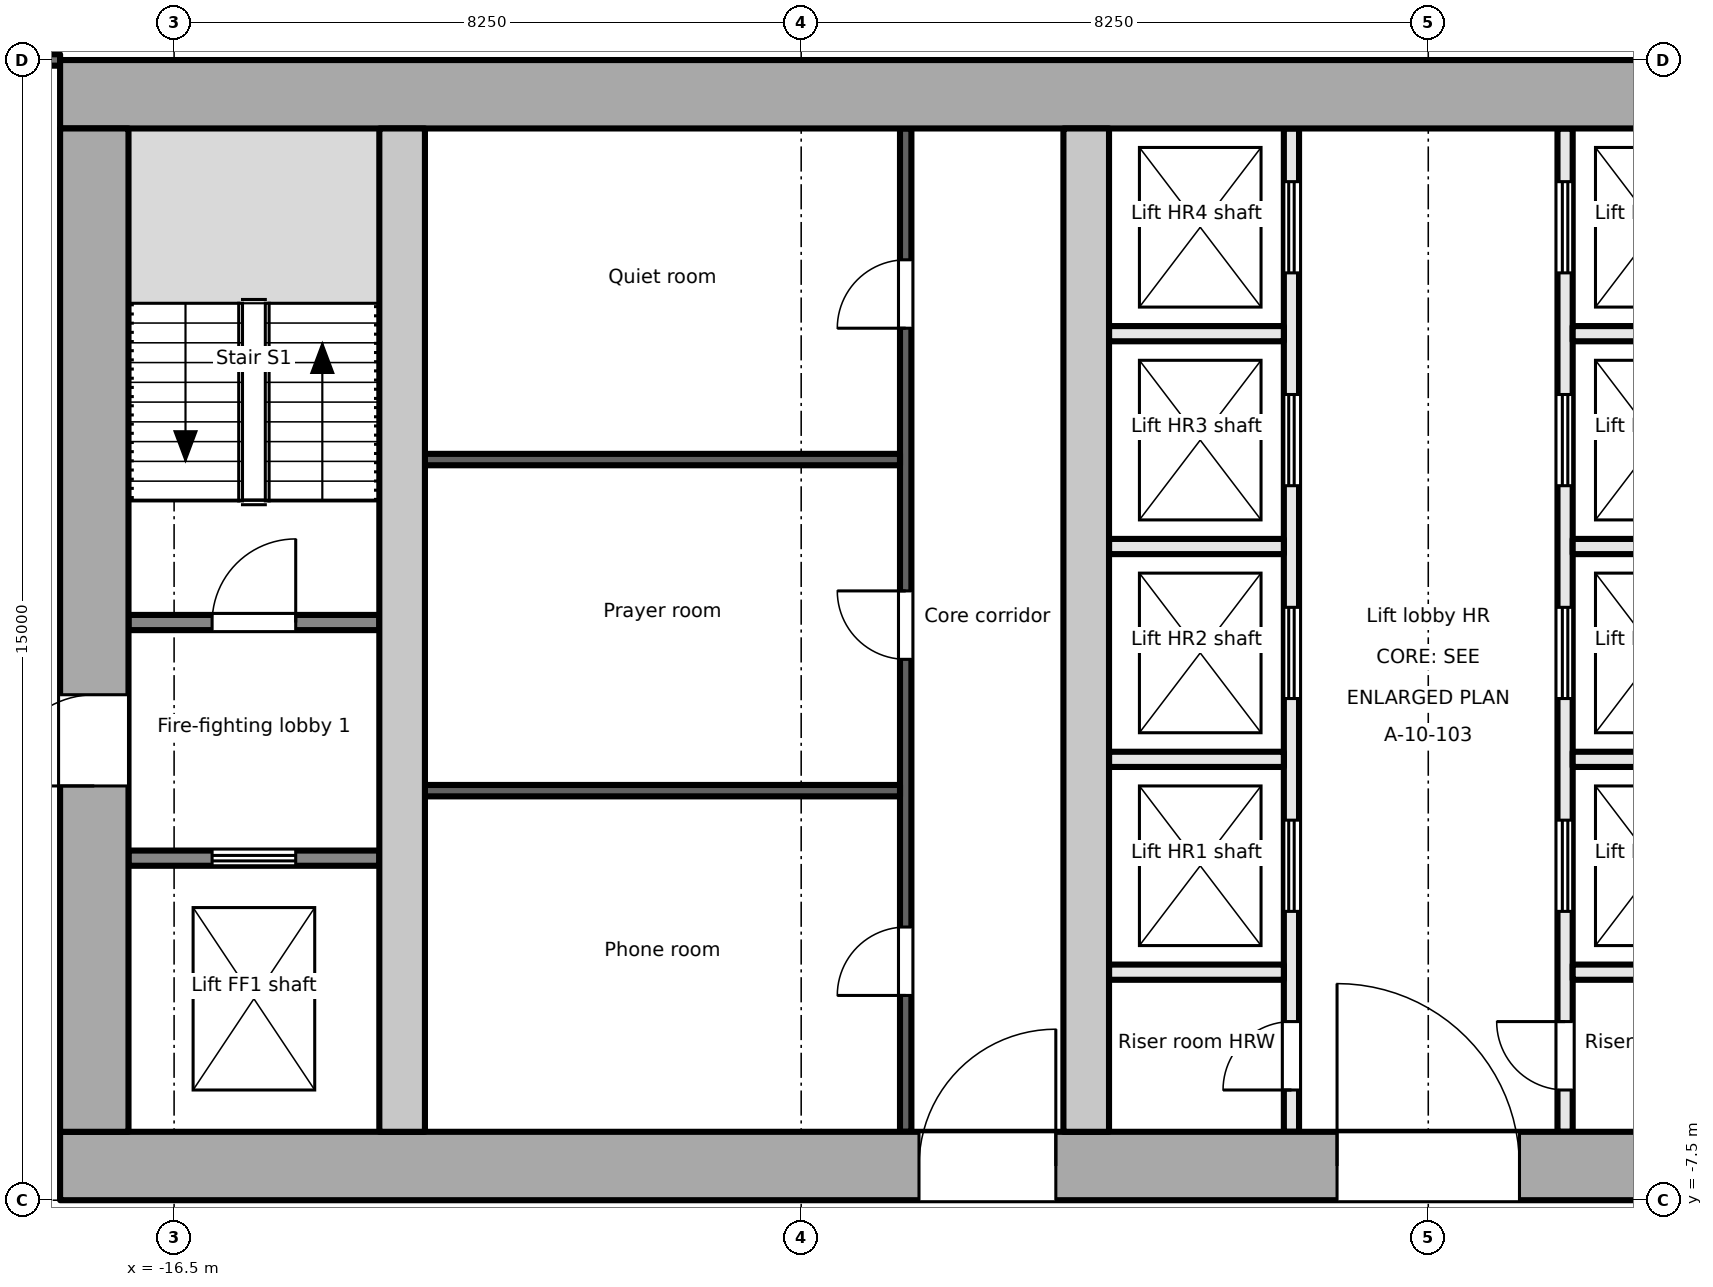
"""IFC4 building model, lengths in metres.
Left out: names, types, materials, properties, quantities, classifications, styles, units other than length and angle.
Written with IfcOpenShell. Run it as: python <this file> out.ifc"""

import sys

from ifc_helpers import new_model, si_unit, direction, frame, frame_2d, origin, place, context, subcontext, project, spatial, rectangle, extrude, element, fill, save


model = new_model("IFC4")
c1 = context("Model", 3, precision=1e-05, world=origin(), true_north=direction((0.0, 1.0)))
c2 = subcontext(c1, "Body", "Model", "MODEL_VIEW")
j1 = project(units=[si_unit("LENGTHUNIT", "METRE"), si_unit("PLANEANGLEUNIT", "RADIAN")], contexts=[c1])
p1 = place(None, origin())
s1 = spatial("IfcSite", under=j1, at=p1, CompositionType="ELEMENT")
p2 = place(p1, origin())
s2 = spatial("IfcBuilding", under=s1, at=p2, CompositionType="ELEMENT")
p3 = place(p2, frame((0.0, 0.0, 188.0)))
s3 = spatial("IfcBuildingStorey", under=s2, at=p3, CompositionType="ELEMENT", Elevation=188.0)
p4 = place(p3, frame((-18.0, -7.05, -0.2), z_axis=(0.0, 0.0, 1.0), x_axis=(1.0, 0.0, 0.0)))
e1 = element("IfcWall", 1, at=p4, inside=s3, PredefinedType="SHEAR", context=c2, shape_type="SweptSolid", body=[
    extrude(rectangle(XDim=36.0, YDim=0.9, at=frame_2d((18.0, 0.0))), origin(), (0.0, 0.0, 1.0), 3.9),
])
p5 = place(p4, frame((11.3, 0.0, 0.2)))
e2 = element("IfcOpeningElement", 2, at=p5, cuts=e1, PredefinedType="OPENING", context=c2, shape_type="SweptSolid", body=[
    extrude(rectangle(XDim=1.8, YDim=2.1, at=frame_2d((0.9, 1.05))), frame((0.0, 0.46, 0.0), z_axis=(0.0, -1.0, 0.0), x_axis=(1.0, 0.0, 0.0)), (0.0, 0.0, 1.0), 0.921),
])
p6 = place(p4, frame((16.8, 0.0, 0.2)))
e3 = element("IfcOpeningElement", 3, at=p6, cuts=e1, PredefinedType="OPENING", context=c2, shape_type="SweptSolid", body=[
    extrude(rectangle(XDim=2.4, YDim=2.1, at=frame_2d((1.2, 1.05))), frame((0.0, 0.46, 0.0), z_axis=(0.0, -1.0, 0.0), x_axis=(1.0, 0.0, 0.0)), (0.0, 0.0, 1.0), 0.921),
])
p7 = place(p4, frame((26.1, 0.0, 0.2)))
e4 = element("IfcOpeningElement", 4, at=p7, cuts=e1, PredefinedType="OPENING", context=c2, shape_type="SweptSolid", body=[
    extrude(rectangle(XDim=2.4, YDim=2.1, at=frame_2d((1.2, 1.05))), frame((0.0, 0.46, 0.0), z_axis=(0.0, -1.0, 0.0), x_axis=(1.0, 0.0, 0.0)), (0.0, 0.0, 1.0), 0.921),
])
p8 = place(p3, frame((-18.0, 7.05, -0.2), z_axis=(0.0, 0.0, 1.0), x_axis=(1.0, 0.0, 0.0)))
e5 = element("IfcWall", 5, at=p8, inside=s3, PredefinedType="SHEAR", context=c2, shape_type="SweptSolid", body=[
    extrude(rectangle(XDim=36.0, YDim=0.9, at=frame_2d((18.0, 0.0))), origin(), (0.0, 0.0, 1.0), 3.9),
])
p9 = place(p3, frame((-17.55, -6.6, -0.2), z_axis=(0.0, 0.0, 1.0), x_axis=(0.0, 1.0, 0.0)))
e6 = element("IfcWall", 6, at=p9, inside=s3, PredefinedType="SHEAR", context=c2, shape_type="SweptSolid", body=[
    extrude(rectangle(XDim=13.2, YDim=0.9, at=frame_2d((6.6, 0.0))), origin(), (0.0, 0.0, 1.0), 3.9),
])
p10 = place(p9, frame((4.55, 0.0, 0.2)))
e7 = element("IfcOpeningElement", 7, at=p10, cuts=e6, PredefinedType="OPENING", context=c2, shape_type="SweptSolid", body=[
    extrude(rectangle(XDim=1.2, YDim=2.1, at=frame_2d((0.6, 1.05))), frame((0.0, 0.46, 0.0), z_axis=(0.0, -1.0, 0.0), x_axis=(1.0, 0.0, 0.0)), (0.0, 0.0, 1.0), 0.921),
])
for number, where, z_axis, x_axis in (
    (8, (-13.5, -6.6, -0.2), (0.0, 0.0, 1.0), (0.0, 1.0, 0.0)),
    (9, (-4.5, -6.6, -0.2), (0.0, 0.0, 1.0), (0.0, 1.0, 0.0)),
):
    element("IfcWall", number, at=place(p3, frame(where, z_axis=z_axis, x_axis=x_axis)), inside=s3, PredefinedType="SHEAR", context=c2, shape_type="SweptSolid", body=[
        extrude(rectangle(XDim=13.2, YDim=0.6, at=frame_2d((6.6, 0.0))), origin(), (0.0, 0.0, 1.0), 3.9),
    ])
p11 = place(p3, frame((-17.1, -3.0, 0.0), z_axis=(0.0, 0.0, 1.0), x_axis=(1.0, 0.0, 0.0)))
e10 = element("IfcWall", 10, at=p11, inside=s3, PredefinedType="PARTITIONING", context=c2, shape_type="SweptSolid", body=[
    extrude(rectangle(XDim=3.3, YDim=0.2, at=frame_2d((1.65, 0.0))), origin(), (0.0, 0.0, 1.0), 3.7),
])
p12 = place(p11, frame((1.1, 0.0, 0.0)))
e11 = element("IfcOpeningElement", 11, at=p12, cuts=e10, PredefinedType="OPENING", context=c2, shape_type="SweptSolid", body=[
    extrude(rectangle(XDim=1.1, YDim=2.1, at=frame_2d((0.55, 1.05))), frame((0.0, 0.111, 0.0), z_axis=(0.0, -1.0, 0.0), x_axis=(1.0, 0.0, 0.0)), (0.0, 0.0, 1.0), 0.221),
])
p13 = place(p3, frame((-17.1, 0.1, 0.0), z_axis=(0.0, 0.0, 1.0), x_axis=(1.0, 0.0, 0.0)))
e12 = element("IfcWall", 12, at=p13, inside=s3, PredefinedType="PARTITIONING", context=c2, shape_type="SweptSolid", body=[
    extrude(rectangle(XDim=3.3, YDim=0.2, at=frame_2d((1.65, 0.0))), origin(), (0.0, 0.0, 1.0), 3.7),
])
p14 = place(p13, frame((1.1, 0.0, 0.0)))
e13 = element("IfcOpeningElement", 13, at=p14, cuts=e12, PredefinedType="OPENING", context=c2, shape_type="SweptSolid", body=[
    extrude(rectangle(XDim=1.1, YDim=2.1, at=frame_2d((0.55, 1.05))), frame((0.0, 0.111, 0.0), z_axis=(0.0, -1.0, 0.0), x_axis=(1.0, 0.0, 0.0)), (0.0, 0.0, 1.0), 0.221),
])
p15 = place(p3, frame((-6.875, -6.6, 0.0), z_axis=(0.0, 0.0, 1.0), x_axis=(0.0, 1.0, 0.0)))
e14 = element("IfcWall", 14, at=p15, inside=s3, PredefinedType="PARTITIONING", context=c2, shape_type="SweptSolid", body=[
    extrude(rectangle(XDim=13.2, YDim=0.15, at=frame_2d((6.6, 0.0))), origin(), (0.0, 0.0, 1.0), 3.7),
])
p16 = place(p15, frame((1.794, 0.0, 0.0)))
e15 = element("IfcOpeningElement", 15, at=p16, cuts=e14, PredefinedType="OPENING", context=c2, shape_type="SweptSolid", body=[
    extrude(rectangle(XDim=0.9, YDim=2.1, at=frame_2d((0.45, 1.05))), frame((0.0, 0.085, 0.0), z_axis=(0.0, -1.0, 0.0), x_axis=(1.0, 0.0, 0.0)), (0.0, 0.0, 1.0), 0.171),
])
p17 = place(p15, frame((6.216, 0.0, 0.0)))
e16 = element("IfcOpeningElement", 16, at=p17, cuts=e14, PredefinedType="OPENING", context=c2, shape_type="SweptSolid", body=[
    extrude(rectangle(XDim=0.9, YDim=2.1, at=frame_2d((0.45, 1.05))), frame((0.0, 0.085, 0.0), z_axis=(0.0, -1.0, 0.0), x_axis=(1.0, 0.0, 0.0)), (0.0, 0.0, 1.0), 0.171),
])
p18 = place(p15, frame((10.572, 0.0, 0.0)))
e17 = element("IfcOpeningElement", 17, at=p18, cuts=e14, PredefinedType="OPENING", context=c2, shape_type="SweptSolid", body=[
    extrude(rectangle(XDim=0.9, YDim=2.1, at=frame_2d((0.45, 1.05))), frame((0.0, 0.085, 0.0), z_axis=(0.0, -1.0, 0.0), x_axis=(1.0, 0.0, 0.0)), (0.0, 0.0, 1.0), 0.171),
])
for number, where, z_axis, x_axis in (
    (18, (-13.2, -2.112, 0.0), (0.0, 0.0, 1.0), (1.0, 0.0, 0.0)),
    (19, (-13.2, 2.244, 0.0), (0.0, 0.0, 1.0), (1.0, 0.0, 0.0)),
):
    element("IfcWall", number, at=place(p3, frame(where, z_axis=z_axis, x_axis=x_axis)), inside=s3, PredefinedType="PARTITIONING", context=c2, shape_type="SweptSolid", body=[
        extrude(rectangle(XDim=6.25, YDim=0.15, at=frame_2d((3.125, 0.0))), origin(), (0.0, 0.0, 1.0), 3.7),
    ])
p19 = place(p3, frame((-1.8, -6.6, 0.0), z_axis=(0.0, 0.0, 1.0), x_axis=(0.0, 1.0, 0.0)))
e20 = element("IfcWall", 20, at=p19, inside=s3, PredefinedType="PARTITIONING", context=c2, shape_type="SweptSolid", body=[
    extrude(rectangle(XDim=13.2, YDim=0.2, at=frame_2d((6.6, 0.0))), origin(), (0.0, 0.0, 1.0), 3.7),
])
p20 = place(p19, frame((0.55, 0.0, 0.0)))
e21 = element("IfcOpeningElement", 21, at=p20, cuts=e20, PredefinedType="OPENING", context=c2, shape_type="SweptSolid", body=[
    extrude(rectangle(XDim=0.9, YDim=2.1, at=frame_2d((0.45, 1.05))), frame((0.0, 0.111, 0.0), z_axis=(0.0, -1.0, 0.0), x_axis=(1.0, 0.0, 0.0)), (0.0, 0.0, 1.0), 0.221),
])
p21 = place(p19, frame((2.9, 0.0, 0.0)))
e22 = element("IfcOpeningElement", 22, at=p21, cuts=e20, PredefinedType="OPENING", context=c2, shape_type="SweptSolid", body=[
    extrude(rectangle(XDim=1.2, YDim=2.1, at=frame_2d((0.6, 1.05))), frame((0.0, 0.111, 0.0), z_axis=(0.0, -1.0, 0.0), x_axis=(1.0, 0.0, 0.0)), (0.0, 0.0, 1.0), 0.221),
])
p22 = place(p19, frame((5.7, 0.0, 0.0)))
e23 = element("IfcOpeningElement", 23, at=p22, cuts=e20, PredefinedType="OPENING", context=c2, shape_type="SweptSolid", body=[
    extrude(rectangle(XDim=1.2, YDim=2.1, at=frame_2d((0.6, 1.05))), frame((0.0, 0.111, 0.0), z_axis=(0.0, -1.0, 0.0), x_axis=(1.0, 0.0, 0.0)), (0.0, 0.0, 1.0), 0.221),
])
p23 = place(p19, frame((8.5, 0.0, 0.0)))
e24 = element("IfcOpeningElement", 24, at=p23, cuts=e20, PredefinedType="OPENING", context=c2, shape_type="SweptSolid", body=[
    extrude(rectangle(XDim=1.2, YDim=2.1, at=frame_2d((0.6, 1.05))), frame((0.0, 0.111, 0.0), z_axis=(0.0, -1.0, 0.0), x_axis=(1.0, 0.0, 0.0)), (0.0, 0.0, 1.0), 0.221),
])
p24 = place(p19, frame((11.3, 0.0, 0.0)))
e25 = element("IfcOpeningElement", 25, at=p24, cuts=e20, PredefinedType="OPENING", context=c2, shape_type="SweptSolid", body=[
    extrude(rectangle(XDim=1.2, YDim=2.1, at=frame_2d((0.6, 1.05))), frame((0.0, 0.111, 0.0), z_axis=(0.0, -1.0, 0.0), x_axis=(1.0, 0.0, 0.0)), (0.0, 0.0, 1.0), 0.221),
])
p25 = place(p3, frame((1.8, -6.6, 0.0), z_axis=(0.0, 0.0, 1.0), x_axis=(0.0, 1.0, 0.0)))
e26 = element("IfcWall", 26, at=p25, inside=s3, PredefinedType="PARTITIONING", context=c2, shape_type="SweptSolid", body=[
    extrude(rectangle(XDim=13.2, YDim=0.2, at=frame_2d((6.6, 0.0))), origin(), (0.0, 0.0, 1.0), 3.7),
])
p26 = place(p25, frame((0.55, 0.0, 0.0)))
e27 = element("IfcOpeningElement", 27, at=p26, cuts=e26, PredefinedType="OPENING", context=c2, shape_type="SweptSolid", body=[
    extrude(rectangle(XDim=0.9, YDim=2.1, at=frame_2d((0.45, 1.05))), frame((0.0, 0.111, 0.0), z_axis=(0.0, -1.0, 0.0), x_axis=(1.0, 0.0, 0.0)), (0.0, 0.0, 1.0), 0.221),
])
p27 = place(p25, frame((2.9, 0.0, 0.0)))
e28 = element("IfcOpeningElement", 28, at=p27, cuts=e26, PredefinedType="OPENING", context=c2, shape_type="SweptSolid", body=[
    extrude(rectangle(XDim=1.2, YDim=2.1, at=frame_2d((0.6, 1.05))), frame((0.0, 0.111, 0.0), z_axis=(0.0, -1.0, 0.0), x_axis=(1.0, 0.0, 0.0)), (0.0, 0.0, 1.0), 0.221),
])
p28 = place(p25, frame((5.7, 0.0, 0.0)))
e29 = element("IfcOpeningElement", 29, at=p28, cuts=e26, PredefinedType="OPENING", context=c2, shape_type="SweptSolid", body=[
    extrude(rectangle(XDim=1.2, YDim=2.1, at=frame_2d((0.6, 1.05))), frame((0.0, 0.111, 0.0), z_axis=(0.0, -1.0, 0.0), x_axis=(1.0, 0.0, 0.0)), (0.0, 0.0, 1.0), 0.221),
])
p29 = place(p25, frame((8.5, 0.0, 0.0)))
e30 = element("IfcOpeningElement", 30, at=p29, cuts=e26, PredefinedType="OPENING", context=c2, shape_type="SweptSolid", body=[
    extrude(rectangle(XDim=1.2, YDim=2.1, at=frame_2d((0.6, 1.05))), frame((0.0, 0.111, 0.0), z_axis=(0.0, -1.0, 0.0), x_axis=(1.0, 0.0, 0.0)), (0.0, 0.0, 1.0), 0.221),
])
p30 = place(p25, frame((11.3, 0.0, 0.0)))
e31 = element("IfcOpeningElement", 31, at=p30, cuts=e26, PredefinedType="OPENING", context=c2, shape_type="SweptSolid", body=[
    extrude(rectangle(XDim=1.2, YDim=2.1, at=frame_2d((0.6, 1.05))), frame((0.0, 0.111, 0.0), z_axis=(0.0, -1.0, 0.0), x_axis=(1.0, 0.0, 0.0)), (0.0, 0.0, 1.0), 0.221),
])
for number, where, z_axis, x_axis in (
    (32, (-4.2, -1.7, 0.0), (0.0, 0.0, 1.0), (1.0, 0.0, 0.0)),
    (33, (-4.2, 1.1, 0.0), (0.0, 0.0, 1.0), (1.0, 0.0, 0.0)),
    (34, (-4.2, 3.9, 0.0), (0.0, 0.0, 1.0), (1.0, 0.0, 0.0)),
    (35, (-4.2, -4.5, 0.0), (0.0, 0.0, 1.0), (1.0, 0.0, 0.0)),
    (36, (1.9, -1.7, 0.0), (0.0, 0.0, 1.0), (1.0, 0.0, 0.0)),
    (37, (1.9, 1.1, 0.0), (0.0, 0.0, 1.0), (1.0, 0.0, 0.0)),
    (38, (1.9, 3.9, 0.0), (0.0, 0.0, 1.0), (1.0, 0.0, 0.0)),
    (39, (1.9, -4.5, 0.0), (0.0, 0.0, 1.0), (1.0, 0.0, 0.0)),
):
    element("IfcWall", number, at=place(p3, frame(where, z_axis=z_axis, x_axis=x_axis)), inside=s3, PredefinedType="PARTITIONING", context=c2, shape_type="SweptSolid", body=[
        extrude(rectangle(XDim=2.3, YDim=0.2, at=frame_2d((1.15, 0.0))), origin(), (0.0, 0.0, 1.0), 3.7),
    ])
p31 = place(p3, frame((-20.625, 7.501, 0.0), z_axis=(0.0, 0.0, 1.0), x_axis=(1.0, 0.0, 0.0)))
e40 = element("IfcWall", 40, at=p31, inside=s3, PredefinedType="PARTITIONING", context=c2, shape_type="SweptSolid", body=[
    extrude(rectangle(XDim=2.625, YDim=0.15, at=frame_2d((1.312, 0.0))), origin(), (0.0, 0.0, 1.0), 3.7),
])
p32 = place(p12, origin())
e41 = element("IfcDoor", 41, at=p32, inside=s3, OperationType="DOUBLE_DOOR_SLIDING", PredefinedType="DOOR", context=c2, shape_type="SweptSolid", body=[
    extrude(rectangle(XDim=1.1, YDim=2.1, at=frame_2d((0.55, 1.05))), frame((0.0, 0.025, 0.0), z_axis=(0.0, -1.0, 0.0), x_axis=(1.0, 0.0, 0.0)), (0.0, 0.0, 1.0), 0.05),
])
fill(e11, e41)
p33 = place(p10, origin())
e42 = element("IfcDoor", 42, at=p33, inside=s3, OperationType="SINGLE_SWING_LEFT", PredefinedType="DOOR", context=c2, shape_type="SweptSolid", body=[
    extrude(rectangle(XDim=1.2, YDim=2.1, at=frame_2d((0.6, 1.05))), frame((0.0, 0.025, 0.0), z_axis=(0.0, -1.0, 0.0), x_axis=(1.0, 0.0, 0.0)), (0.0, 0.0, 1.0), 0.05),
])
fill(e7, e42)
p34 = place(p14, origin())
e43 = element("IfcDoor", 43, at=p34, inside=s3, OperationType="SINGLE_SWING_RIGHT", PredefinedType="DOOR", context=c2, shape_type="SweptSolid", body=[
    extrude(rectangle(XDim=1.1, YDim=2.1, at=frame_2d((0.55, 1.05))), frame((0.0, 0.025, 0.0), z_axis=(0.0, -1.0, 0.0), x_axis=(1.0, 0.0, 0.0)), (0.0, 0.0, 1.0), 0.05),
])
fill(e13, e43)
p35 = place(p16, origin())
e44 = element("IfcDoor", 44, at=p35, inside=s3, OperationType="SINGLE_SWING_LEFT", PredefinedType="DOOR", context=c2, shape_type="SweptSolid", body=[
    extrude(rectangle(XDim=0.9, YDim=2.1, at=frame_2d((0.45, 1.05))), frame((0.0, 0.025, 0.0), z_axis=(0.0, -1.0, 0.0), x_axis=(1.0, 0.0, 0.0)), (0.0, 0.0, 1.0), 0.05),
])
fill(e15, e44)
p36 = place(p17, origin())
e45 = element("IfcDoor", 45, at=p36, inside=s3, OperationType="SINGLE_SWING_RIGHT", PredefinedType="DOOR", context=c2, shape_type="SweptSolid", body=[
    extrude(rectangle(XDim=0.9, YDim=2.1, at=frame_2d((0.45, 1.05))), frame((0.0, 0.025, 0.0), z_axis=(0.0, -1.0, 0.0), x_axis=(1.0, 0.0, 0.0)), (0.0, 0.0, 1.0), 0.05),
])
fill(e16, e45)
p37 = place(p18, origin())
e46 = element("IfcDoor", 46, at=p37, inside=s3, OperationType="SINGLE_SWING_LEFT", PredefinedType="DOOR", context=c2, shape_type="SweptSolid", body=[
    extrude(rectangle(XDim=0.9, YDim=2.1, at=frame_2d((0.45, 1.05))), frame((0.0, 0.025, 0.0), z_axis=(0.0, -1.0, 0.0), x_axis=(1.0, 0.0, 0.0)), (0.0, 0.0, 1.0), 0.05),
])
fill(e17, e46)
p38 = place(p5, origin())
e47 = element("IfcDoor", 47, at=p38, inside=s3, OperationType="SINGLE_SWING_RIGHT", PredefinedType="DOOR", context=c2, shape_type="SweptSolid", body=[
    extrude(rectangle(XDim=1.8, YDim=2.1, at=frame_2d((0.9, 1.05))), frame((0.0, 0.025, 0.0), z_axis=(0.0, -1.0, 0.0), x_axis=(1.0, 0.0, 0.0)), (0.0, 0.0, 1.0), 0.05),
])
fill(e2, e47)
p39 = place(p20, origin())
e48 = element("IfcDoor", 48, at=p39, inside=s3, OperationType="SINGLE_SWING_LEFT", PredefinedType="DOOR", context=c2, shape_type="SweptSolid", body=[
    extrude(rectangle(XDim=0.9, YDim=2.1, at=frame_2d((0.45, 1.05))), frame((0.0, 0.025, 0.0), z_axis=(0.0, -1.0, 0.0), x_axis=(1.0, 0.0, 0.0)), (0.0, 0.0, 1.0), 0.05),
])
fill(e21, e48)
p40 = place(p21, origin())
e49 = element("IfcDoor", 49, at=p40, inside=s3, OperationType="DOUBLE_DOOR_SLIDING", PredefinedType="DOOR", context=c2, shape_type="SweptSolid", body=[
    extrude(rectangle(XDim=1.2, YDim=2.1, at=frame_2d((0.6, 1.05))), frame((0.0, 0.025, 0.0), z_axis=(0.0, -1.0, 0.0), x_axis=(1.0, 0.0, 0.0)), (0.0, 0.0, 1.0), 0.05),
])
fill(e22, e49)
p41 = place(p22, origin())
e50 = element("IfcDoor", 50, at=p41, inside=s3, OperationType="DOUBLE_DOOR_SLIDING", PredefinedType="DOOR", context=c2, shape_type="SweptSolid", body=[
    extrude(rectangle(XDim=1.2, YDim=2.1, at=frame_2d((0.6, 1.05))), frame((0.0, 0.025, 0.0), z_axis=(0.0, -1.0, 0.0), x_axis=(1.0, 0.0, 0.0)), (0.0, 0.0, 1.0), 0.05),
])
fill(e23, e50)
p42 = place(p23, origin())
e51 = element("IfcDoor", 51, at=p42, inside=s3, OperationType="DOUBLE_DOOR_SLIDING", PredefinedType="DOOR", context=c2, shape_type="SweptSolid", body=[
    extrude(rectangle(XDim=1.2, YDim=2.1, at=frame_2d((0.6, 1.05))), frame((0.0, 0.025, 0.0), z_axis=(0.0, -1.0, 0.0), x_axis=(1.0, 0.0, 0.0)), (0.0, 0.0, 1.0), 0.05),
])
fill(e24, e51)
p43 = place(p24, origin())
e52 = element("IfcDoor", 52, at=p43, inside=s3, OperationType="DOUBLE_DOOR_SLIDING", PredefinedType="DOOR", context=c2, shape_type="SweptSolid", body=[
    extrude(rectangle(XDim=1.2, YDim=2.1, at=frame_2d((0.6, 1.05))), frame((0.0, 0.025, 0.0), z_axis=(0.0, -1.0, 0.0), x_axis=(1.0, 0.0, 0.0)), (0.0, 0.0, 1.0), 0.05),
])
fill(e25, e52)
p44 = place(p26, origin())
e53 = element("IfcDoor", 53, at=p44, inside=s3, OperationType="SINGLE_SWING_RIGHT", PredefinedType="DOOR", context=c2, shape_type="SweptSolid", body=[
    extrude(rectangle(XDim=0.9, YDim=2.1, at=frame_2d((0.45, 1.05))), frame((0.0, 0.025, 0.0), z_axis=(0.0, -1.0, 0.0), x_axis=(1.0, 0.0, 0.0)), (0.0, 0.0, 1.0), 0.05),
])
fill(e27, e53)
p45 = place(p27, origin())
e54 = element("IfcDoor", 54, at=p45, inside=s3, OperationType="DOUBLE_DOOR_SLIDING", PredefinedType="DOOR", context=c2, shape_type="SweptSolid", body=[
    extrude(rectangle(XDim=1.2, YDim=2.1, at=frame_2d((0.6, 1.05))), frame((0.0, 0.025, 0.0), z_axis=(0.0, -1.0, 0.0), x_axis=(1.0, 0.0, 0.0)), (0.0, 0.0, 1.0), 0.05),
])
fill(e28, e54)
p46 = place(p28, origin())
e55 = element("IfcDoor", 55, at=p46, inside=s3, OperationType="DOUBLE_DOOR_SLIDING", PredefinedType="DOOR", context=c2, shape_type="SweptSolid", body=[
    extrude(rectangle(XDim=1.2, YDim=2.1, at=frame_2d((0.6, 1.05))), frame((0.0, 0.025, 0.0), z_axis=(0.0, -1.0, 0.0), x_axis=(1.0, 0.0, 0.0)), (0.0, 0.0, 1.0), 0.05),
])
fill(e29, e55)
p47 = place(p29, origin())
e56 = element("IfcDoor", 56, at=p47, inside=s3, OperationType="DOUBLE_DOOR_SLIDING", PredefinedType="DOOR", context=c2, shape_type="SweptSolid", body=[
    extrude(rectangle(XDim=1.2, YDim=2.1, at=frame_2d((0.6, 1.05))), frame((0.0, 0.025, 0.0), z_axis=(0.0, -1.0, 0.0), x_axis=(1.0, 0.0, 0.0)), (0.0, 0.0, 1.0), 0.05),
])
fill(e30, e56)
p48 = place(p30, origin())
e57 = element("IfcDoor", 57, at=p48, inside=s3, OperationType="DOUBLE_DOOR_SLIDING", PredefinedType="DOOR", context=c2, shape_type="SweptSolid", body=[
    extrude(rectangle(XDim=1.2, YDim=2.1, at=frame_2d((0.6, 1.05))), frame((0.0, 0.025, 0.0), z_axis=(0.0, -1.0, 0.0), x_axis=(1.0, 0.0, 0.0)), (0.0, 0.0, 1.0), 0.05),
])
fill(e31, e57)
p49 = place(p6, origin())
e58 = element("IfcDoor", 58, at=p49, inside=s3, OperationType="DOUBLE_DOOR_DOUBLE_SWING", PredefinedType="DOOR", context=c2, shape_type="SweptSolid", body=[
    extrude(rectangle(XDim=2.4, YDim=2.1, at=frame_2d((1.2, 1.05))), frame((0.0, 0.025, 0.0), z_axis=(0.0, -1.0, 0.0), x_axis=(1.0, 0.0, 0.0)), (0.0, 0.0, 1.0), 0.05),
])
fill(e3, e58)
save(model, sys.argv[1])
